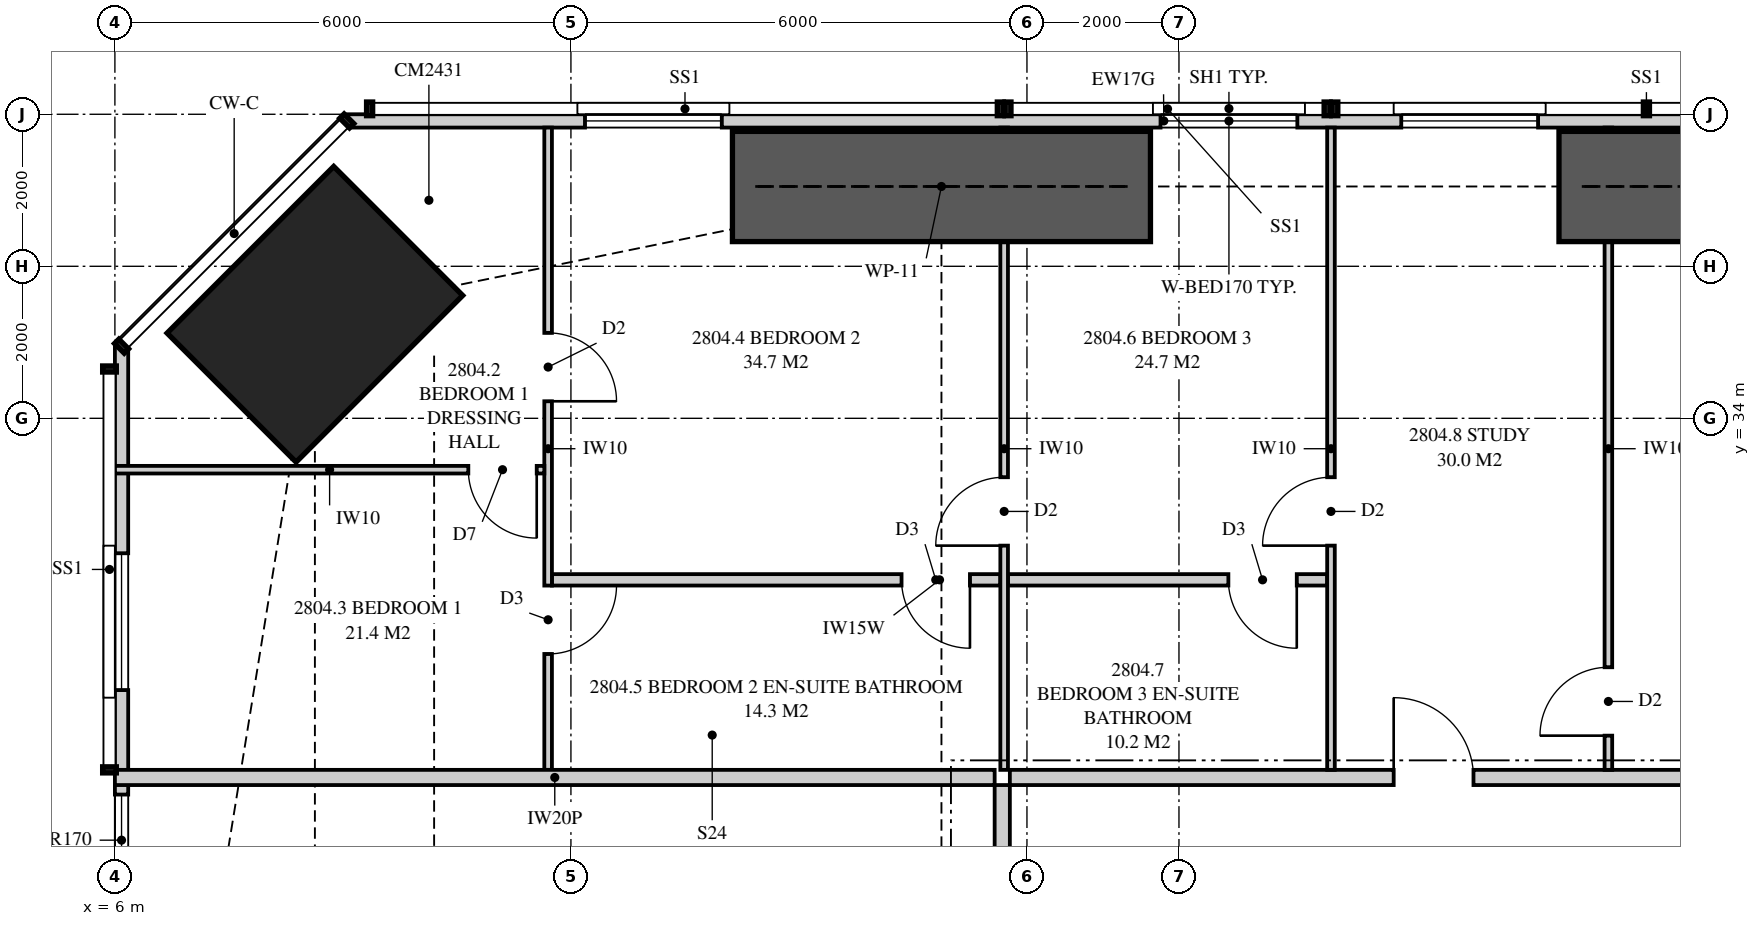
"""IFC4 building model, lengths in metres.
Left out: names, types, materials, properties, quantities, classifications, styles, units other than length and angle.
Written with IfcOpenShell. Run it as: python <this file> out.ifc"""

import sys

from ifc_helpers import new_model, si_unit, direction, frame, frame_2d, origin, origin_2d, place, context, subcontext, project, spatial, polyline, rectangle, outline, extrude, element, fill, save


model = new_model("IFC4")
c1 = context("Model", 3, precision=1e-05, world=origin(), true_north=direction((0.0, 1.0)))
c2 = subcontext(c1, "Body", "Model", "MODEL_VIEW")
j1 = project(units=[si_unit("LENGTHUNIT", "METRE"), si_unit("PLANEANGLEUNIT", "RADIAN")], contexts=[c1])
p1 = place(None, origin())
s1 = spatial("IfcSite", under=j1, at=p1, CompositionType="ELEMENT")
p2 = place(p1, origin())
s2 = spatial("IfcBuilding", under=s1, at=p2, CompositionType="ELEMENT")
p3 = place(p2, frame((0.0, 0.0, 104.85)))
s3 = spatial("IfcBuildingStorey", under=s2, at=p3, CompositionType="ELEMENT", Elevation=104.85)
p4 = place(p3, frame((8.631, 35.369, 0.0), z_axis=(0.0, 0.0, 1.0), x_axis=(0.707106781187, -0.707106781187, 0.0)))
e1 = element("IfcColumn", 1, at=p4, inside=s3, PredefinedType="COLUMN", context=c2, shape_type="SweptSolid", body=[
    extrude(rectangle(XDim=2.4, YDim=3.1, at=origin_2d()), origin(), (0.0, 0.0, 1.0), 3.35),
])
p5 = place(p3, frame((30.551, 37.913, 0.0), z_axis=(0.0, 0.0, 1.0), x_axis=(-1.0, 0.0, 0.0)))
e2 = element("IfcWall", 2, at=p5, inside=s3, PredefinedType="SOLIDWALL", context=c2, shape_type="SweptSolid", body=[
    extrude(outline(polyline([(0.0, 0.0), (21.499, 0.0), (21.499, 3.11), (13.879, 3.11), (13.879, 2.15), (13.834, 2.15), (13.834, 3.11), (13.676, 3.11), (13.676, 2.15), (0.0, 2.15), (0.0, 0.0)])), frame((0.0, 0.087, 0.0), z_axis=(0.0, -1.0, 0.0), x_axis=(1.0, 0.0, 0.0)), (0.0, 0.0, 1.0), 0.175),
])
p6 = place(p5, frame((5.826, 0.0, 0.4)))
e3 = element("IfcOpeningElement", 3, at=p6, cuts=e2, PredefinedType="OPENING", context=c2, shape_type="SweptSolid", body=[
    extrude(rectangle(XDim=1.8, YDim=1.7, at=frame_2d((0.9, 0.85))), frame((0.0, 0.097, 0.0), z_axis=(0.0, -1.0, 0.0), x_axis=(1.0, 0.0, 0.0)), (0.0, 0.0, 1.0), 0.195),
])
p7 = place(p5, frame((8.993, 0.0, 0.4)))
e4 = element("IfcOpeningElement", 4, at=p7, cuts=e2, PredefinedType="OPENING", context=c2, shape_type="SweptSolid", body=[
    extrude(rectangle(XDim=1.8, YDim=1.7, at=frame_2d((0.9, 0.85))), frame((0.0, 0.097, 0.0), z_axis=(0.0, -1.0, 0.0), x_axis=(1.0, 0.0, 0.0)), (0.0, 0.0, 1.0), 0.195),
])
p8 = place(p5, frame((16.566, 0.0, 0.4)))
e5 = element("IfcOpeningElement", 5, at=p8, cuts=e2, PredefinedType="OPENING", context=c2, shape_type="SweptSolid", body=[
    extrude(rectangle(XDim=1.8, YDim=1.7, at=frame_2d((0.9, 0.85))), frame((0.0, 0.097, 0.0), z_axis=(0.0, -1.0, 0.0), x_axis=(1.0, 0.0, 0.0)), (0.0, 0.0, 1.0), 0.195),
])
p9 = place(p3, frame((6.087, 34.949, 0.0), z_axis=(0.0, 0.0, 1.0), x_axis=(0.0, -1.0, 0.0)))
e6 = element("IfcWall", 6, at=p9, inside=s3, PredefinedType="SOLIDWALL", context=c2, shape_type="SweptSolid", body=[
    extrude(outline(polyline([(0.0, 0.0), (15.799, 0.0), (15.799, 2.15), (9.949, 2.15), (9.949, 3.11), (9.823, 3.11), (9.823, 2.15), (9.73, 2.15), (9.73, 3.11), (0.0, 3.11), (0.0, 0.0)])), frame((0.0, 0.087, 0.0), z_axis=(0.0, -1.0, 0.0), x_axis=(1.0, 0.0, 0.0)), (0.0, 0.0, 1.0), 0.175),
])
p10 = place(p9, frame((2.724, 0.0, 0.4)))
e7 = element("IfcOpeningElement", 7, at=p10, cuts=e6, PredefinedType="OPENING", context=c2, shape_type="SweptSolid", body=[
    extrude(rectangle(XDim=1.8, YDim=1.7, at=frame_2d((0.9, 0.85))), frame((0.0, 0.097, 0.0), z_axis=(0.0, -1.0, 0.0), x_axis=(1.0, 0.0, 0.0)), (0.0, 0.0, 1.0), 0.195),
])
p11 = place(p9, frame((5.899, 0.0, 0.4)))
e8 = element("IfcOpeningElement", 8, at=p11, cuts=e6, PredefinedType="OPENING", context=c2, shape_type="SweptSolid", body=[
    extrude(rectangle(XDim=1.2, YDim=1.7, at=frame_2d((0.6, 0.85))), frame((0.0, 0.097, 0.0), z_axis=(0.0, -1.0, 0.0), x_axis=(1.0, 0.0, 0.0)), (0.0, 0.0, 1.0), 0.195),
])
p12 = place(p9, frame((13.049, 0.0, 0.4)))
e9 = element("IfcOpeningElement", 9, at=p12, cuts=e6, PredefinedType="OPENING", context=c2, shape_type="SweptSolid", body=[
    extrude(rectangle(XDim=1.8, YDim=1.7, at=frame_2d((0.9, 0.85))), frame((0.0, 0.097, 0.0), z_axis=(0.0, -1.0, 0.0), x_axis=(1.0, 0.0, 0.0)), (0.0, 0.0, 1.0), 0.195),
])
p13 = place(p3, frame((17.775, 29.275, 0.0), z_axis=(0.0, 0.0, 1.0), x_axis=(1.0, 0.0, 0.0)))
e10 = element("IfcWall", 10, at=p13, inside=s3, PredefinedType="PARTITIONING", context=c2, shape_type="SweptSolid", body=[
    extrude(rectangle(XDim=9.188, YDim=0.2, at=frame_2d((4.594, 0.0))), origin(), (0.0, 0.0, 1.0), 3.11),
])
p14 = place(p13, frame((5.05, 0.0, 0.0)))
e11 = element("IfcOpeningElement", 11, at=p14, cuts=e10, PredefinedType="OPENING", context=c2, shape_type="SweptSolid", body=[
    extrude(rectangle(XDim=1.05, YDim=2.2, at=frame_2d((0.525, 1.1))), frame((0.0, 0.11, 0.0), z_axis=(0.0, -1.0, 0.0), x_axis=(1.0, 0.0, 0.0)), (0.0, 0.0, 1.0), 0.22),
])
p15 = place(p3, frame((11.7, 37.825, 0.0), z_axis=(0.0, 0.0, 1.0), x_axis=(0.0, -1.0, 0.0)))
e12 = element("IfcWall", 12, at=p15, inside=s3, PredefinedType="PARTITIONING", context=c2, shape_type="SweptSolid", body=[
    extrude(outline(polyline([(0.0, 0.0), (8.45, 0.0), (8.45, 3.11), (2.708, 3.11), (2.708, 2.15), (0.953, 2.15), (0.953, 3.11), (0.0, 3.11), (0.0, 0.0)])), frame((0.0, 0.05, 0.0), z_axis=(0.0, -1.0, 0.0), x_axis=(1.0, 0.0, 0.0)), (0.0, 0.0, 1.0), 0.1),
])
p16 = place(p15, frame((2.701, 0.0, 0.0)))
e13 = element("IfcOpeningElement", 13, at=p16, cuts=e12, PredefinedType="OPENING", context=c2, shape_type="SweptSolid", body=[
    extrude(rectangle(XDim=0.9, YDim=2.1, at=frame_2d((0.45, 1.05))), frame((0.0, 0.06, 0.0), z_axis=(0.0, -1.0, 0.0), x_axis=(1.0, 0.0, 0.0)), (0.0, 0.0, 1.0), 0.12),
])
p17 = place(p15, frame((6.025, 0.0, 0.0)))
e14 = element("IfcOpeningElement", 14, at=p17, cuts=e12, PredefinedType="OPENING", context=c2, shape_type="SweptSolid", body=[
    extrude(rectangle(XDim=0.9, YDim=2.1, at=frame_2d((0.45, 1.05))), frame((0.0, 0.06, 0.0), z_axis=(0.0, -1.0, 0.0), x_axis=(1.0, 0.0, 0.0)), (0.0, 0.0, 1.0), 0.12),
])
p18 = place(p3, frame((17.7, 37.825, 0.0), z_axis=(0.0, 0.0, 1.0), x_axis=(0.0, -1.0, 0.0)))
e15 = element("IfcWall", 15, at=p18, inside=s3, PredefinedType="PARTITIONING", context=c2, shape_type="SweptSolid", body=[
    extrude(outline(polyline([(1.635, 2.15), (0.0, 2.15), (0.0, 0.0), (8.45, 0.0), (8.45, 3.11), (1.635, 3.11), (1.635, 2.15)]), holes=[polyline([(1.021, 0.116), (0.529, 0.116), (0.529, 0.906), (1.021, 0.906), (1.021, 0.116)]), polyline([(1.021, 1.244), (0.529, 1.244), (0.529, 2.034), (1.021, 2.034), (1.021, 1.244)])]), frame((0.0, 0.05, 0.0), z_axis=(0.0, -1.0, 0.0), x_axis=(1.0, 0.0, 0.0)), (0.0, 0.0, 1.0), 0.1),
])
p19 = place(p18, frame((4.6, 0.0, 0.0)))
e16 = element("IfcOpeningElement", 16, at=p19, cuts=e15, PredefinedType="OPENING", context=c2, shape_type="SweptSolid", body=[
    extrude(rectangle(XDim=0.9, YDim=2.1, at=frame_2d((0.45, 1.05))), frame((0.0, 0.06, 0.0), z_axis=(0.0, -1.0, 0.0), x_axis=(1.0, 0.0, 0.0)), (0.0, 0.0, 1.0), 0.12),
])
p20 = place(p3, frame((22.0, 37.825, 0.0), z_axis=(0.0, 0.0, 1.0), x_axis=(0.0, -1.0, 0.0)))
e17 = element("IfcWall", 17, at=p20, inside=s3, PredefinedType="PARTITIONING", context=c2, shape_type="SweptSolid", body=[
    extrude(outline(polyline([(0.0, 0.0), (8.45, 0.0), (8.45, 3.11), (1.635, 3.11), (1.635, 2.15), (0.0, 2.15), (0.0, 3.11), (0.0, 0.0)])), frame((0.0, 0.05, 0.0), z_axis=(0.0, -1.0, 0.0), x_axis=(1.0, 0.0, 0.0)), (0.0, 0.0, 1.0), 0.1),
])
p21 = place(p20, frame((4.6, 0.0, 0.0)))
e18 = element("IfcOpeningElement", 18, at=p21, cuts=e17, PredefinedType="OPENING", context=c2, shape_type="SweptSolid", body=[
    extrude(rectangle(XDim=0.9, YDim=2.1, at=frame_2d((0.45, 1.05))), frame((0.0, 0.06, 0.0), z_axis=(0.0, -1.0, 0.0), x_axis=(1.0, 0.0, 0.0)), (0.0, 0.0, 1.0), 0.12),
])
p22 = place(p3, frame((6.0, 33.324, 0.0), z_axis=(0.0, 0.0, 1.0), x_axis=(1.0, 0.0, 0.0)))
e19 = element("IfcWall", 19, at=p22, inside=s3, PredefinedType="PARTITIONING", context=c2, shape_type="SweptSolid", body=[
    extrude(outline(polyline([(0.0, 0.0), (5.65, 0.0), (5.65, 3.11), (5.46, 3.11), (5.46, 2.51), (3.171, 2.51), (3.171, 2.15), (1.429, 2.15), (1.429, 3.11), (0.0, 3.11), (0.0, 0.0)])), frame((0.0, 0.05, 0.0), z_axis=(0.0, -1.0, 0.0), x_axis=(1.0, 0.0, 0.0)), (0.0, 0.0, 1.0), 0.1),
])
p23 = place(p22, frame((4.65, 0.0, 0.0)))
e20 = element("IfcOpeningElement", 20, at=p23, cuts=e19, PredefinedType="OPENING", context=c2, shape_type="SweptSolid", body=[
    extrude(rectangle(XDim=0.9, YDim=2.1, at=frame_2d((0.45, 1.05))), frame((0.0, 0.06, 0.0), z_axis=(0.0, -1.0, 0.0), x_axis=(1.0, 0.0, 0.0)), (0.0, 0.0, 1.0), 0.12),
])
p24 = place(p3, frame((11.75, 31.875, 0.0), z_axis=(0.0, 0.0, 1.0), x_axis=(1.0, 0.0, 0.0)))
e21 = element("IfcWall", 21, at=p24, inside=s3, PredefinedType="PLUMBINGWALL", context=c2, shape_type="SweptSolid", body=[
    extrude(outline(polyline([(0.0, 0.0), (5.9, 0.0), (5.9, 3.11), (5.438, 3.11), (5.438, 2.541), (4.812, 2.541), (4.812, 3.11), (0.0, 3.11), (0.0, 0.0)])), frame((0.0, 0.075, 0.0), z_axis=(0.0, -1.0, 0.0), x_axis=(1.0, 0.0, 0.0)), (0.0, 0.0, 1.0), 0.15),
])
p25 = place(p24, frame((4.6, 0.0, 0.0)))
e22 = element("IfcOpeningElement", 22, at=p25, cuts=e21, PredefinedType="OPENING", context=c2, shape_type="SweptSolid", body=[
    extrude(rectangle(XDim=0.9, YDim=2.1, at=frame_2d((0.45, 1.05))), frame((0.0, 0.085, 0.0), z_axis=(0.0, -1.0, 0.0), x_axis=(1.0, 0.0, 0.0)), (0.0, 0.0, 1.0), 0.17),
])
p26 = place(p3, frame((17.75, 31.875, 0.0), z_axis=(0.0, 0.0, 1.0), x_axis=(1.0, 0.0, 0.0)))
e23 = element("IfcWall", 23, at=p26, inside=s3, PredefinedType="PLUMBINGWALL", context=c2, shape_type="SweptSolid", body=[
    extrude(rectangle(XDim=4.2, YDim=0.15, at=frame_2d((2.1, 0.0))), origin(), (0.0, 0.0, 1.0), 3.11),
])
p27 = place(p26, frame((2.9, 0.0, 0.0)))
e24 = element("IfcOpeningElement", 24, at=p27, cuts=e23, PredefinedType="OPENING", context=c2, shape_type="SweptSolid", body=[
    extrude(rectangle(XDim=0.9, YDim=2.1, at=frame_2d((0.45, 1.05))), frame((0.0, 0.085, 0.0), z_axis=(0.0, -1.0, 0.0), x_axis=(1.0, 0.0, 0.0)), (0.0, 0.0, 1.0), 0.17),
])
p28 = place(p3, frame((25.65, 37.825, 0.0), z_axis=(0.0, 0.0, 1.0), x_axis=(0.0, -1.0, 0.0)))
e25 = element("IfcWall", 25, at=p28, inside=s3, PredefinedType="PARTITIONING", context=c2, shape_type="SweptSolid", body=[
    extrude(outline(polyline([(0.529, 2.15), (0.0, 2.15), (0.0, 0.0), (0.529, 0.0), (0.529, 0.034), (1.021, 0.034), (1.021, 0.0), (8.45, 0.0), (8.45, 3.11), (1.635, 3.11), (1.635, 2.15), (1.021, 2.15), (1.021, 2.116), (0.529, 2.116), (0.529, 2.15)])), frame((0.0, 0.05, 0.0), z_axis=(0.0, -1.0, 0.0), x_axis=(1.0, 0.0, 0.0)), (0.0, 0.0, 1.0), 0.1),
])
p29 = place(p28, frame((7.1, 0.0, 0.0)))
e26 = element("IfcOpeningElement", 26, at=p29, cuts=e25, PredefinedType="OPENING", context=c2, shape_type="SweptSolid", body=[
    extrude(rectangle(XDim=0.9, YDim=2.1, at=frame_2d((0.45, 1.05))), frame((0.0, 0.06, 0.0), z_axis=(0.0, -1.0, 0.0), x_axis=(1.0, 0.0, 0.0)), (0.0, 0.0, 1.0), 0.12),
])
p30 = place(p3, frame((6.0, 29.275, 0.0), z_axis=(0.0, 0.0, 1.0), x_axis=(1.0, 0.0, 0.0)))
e27 = element("IfcWall", 27, at=p30, inside=s3, PredefinedType="PARTITIONING", context=c2, shape_type="SweptSolid", body=[
    extrude(outline(polyline([(0.0, 0.0), (11.575, 0.0), (11.575, 3.11), (11.212, 3.11), (11.212, 2.541), (10.538, 2.541), (10.538, 3.11), (5.51, 3.11), (5.51, 2.51), (2.969, 2.51), (2.969, 2.541), (2.565, 2.541), (2.565, 2.15), (0.721, 2.15), (0.721, 3.11), (0.0, 3.11), (0.0, 0.0)])), frame((0.0, 0.1, 0.0), z_axis=(0.0, -1.0, 0.0), x_axis=(1.0, 0.0, 0.0)), (0.0, 0.0, 1.0), 0.2),
])
p31 = place(p3, frame((17.675, 22.9, 0.0), z_axis=(0.0, 0.0, 1.0), x_axis=(0.0, 1.0, 0.0)))
e28 = element("IfcWall", 28, at=p31, inside=s3, PredefinedType="PARTITIONING", context=c2, shape_type="SweptSolid", body=[
    extrude(outline(polyline([(0.0, 0.0), (6.275, 0.0), (6.275, 3.11), (3.862, 3.11), (3.862, 2.541), (3.188, 2.541), (3.188, 3.11), (0.0, 3.11), (0.0, 0.0)])), frame((0.0, 0.1, 0.0), z_axis=(0.0, -1.0, 0.0), x_axis=(1.0, 0.0, 0.0)), (0.0, 0.0, 1.0), 0.2),
])
p32 = place(p31, frame((2.238, 0.0, 0.0)))
e29 = element("IfcOpeningElement", 29, at=p32, cuts=e28, PredefinedType="OPENING", context=c2, shape_type="SweptSolid", body=[
    extrude(rectangle(XDim=1.8, YDim=2.1, at=frame_2d((0.9, 1.05))), frame((0.0, 0.11, 0.0), z_axis=(0.0, -1.0, 0.0), x_axis=(1.0, 0.0, 0.0)), (0.0, 0.0, 1.0), 0.22),
])
for number, where, z_axis, x_axis in (
    (30, (25.0, 37.05, 0.0), (0.0, 0.0, 1.0), (1.0, 0.0, 0.0)),
    (31, (14.125, 37.05, 0.0), (0.0, 0.0, 1.0), (1.0, 0.0, 0.0)),
):
    element("IfcWall", number, at=place(p3, frame(where, z_axis=z_axis, x_axis=x_axis)), inside=s3, PredefinedType="SHEAR", context=c2, shape_type="SweptSolid", body=[
        extrude(rectangle(XDim=5.5, YDim=1.45, at=frame_2d((2.75, 0.0))), origin(), (0.0, 0.0, 1.0), 3.35),
    ])
p33 = place(p6, origin())
e32 = element("IfcWindow", 32, at=p33, inside=s3, PartitioningType="SINGLE_PANEL", PredefinedType="WINDOW", context=c2, shape_type="SweptSolid", body=[
    extrude(rectangle(XDim=1.8, YDim=1.7, at=frame_2d((0.9, 0.85))), frame((0.0, 0.03, 0.0), z_axis=(0.0, -1.0, 0.0), x_axis=(1.0, 0.0, 0.0)), (0.0, 0.0, 1.0), 0.06),
])
fill(e3, e32)
p34 = place(p7, origin())
e33 = element("IfcWindow", 33, at=p34, inside=s3, PartitioningType="SINGLE_PANEL", PredefinedType="WINDOW", context=c2, shape_type="SweptSolid", body=[
    extrude(rectangle(XDim=1.8, YDim=1.7, at=frame_2d((0.9, 0.85))), frame((0.0, 0.03, 0.0), z_axis=(0.0, -1.0, 0.0), x_axis=(1.0, 0.0, 0.0)), (0.0, 0.0, 1.0), 0.06),
])
fill(e4, e33)
p35 = place(p8, origin())
e34 = element("IfcWindow", 34, at=p35, inside=s3, PartitioningType="SINGLE_PANEL", PredefinedType="WINDOW", context=c2, shape_type="SweptSolid", body=[
    extrude(rectangle(XDim=1.8, YDim=1.7, at=frame_2d((0.9, 0.85))), frame((0.0, 0.03, 0.0), z_axis=(0.0, -1.0, 0.0), x_axis=(1.0, 0.0, 0.0)), (0.0, 0.0, 1.0), 0.06),
])
fill(e5, e34)
p36 = place(p10, origin())
e35 = element("IfcWindow", 35, at=p36, inside=s3, PartitioningType="SINGLE_PANEL", PredefinedType="WINDOW", context=c2, shape_type="SweptSolid", body=[
    extrude(rectangle(XDim=1.8, YDim=1.7, at=frame_2d((0.9, 0.85))), frame((0.0, 0.03, 0.0), z_axis=(0.0, -1.0, 0.0), x_axis=(1.0, 0.0, 0.0)), (0.0, 0.0, 1.0), 0.06),
])
fill(e7, e35)
p37 = place(p11, origin())
e36 = element("IfcWindow", 36, at=p37, inside=s3, PartitioningType="SINGLE_PANEL", PredefinedType="WINDOW", context=c2, shape_type="SweptSolid", body=[
    extrude(rectangle(XDim=1.2, YDim=1.7, at=frame_2d((0.6, 0.85))), frame((0.0, 0.03, 0.0), z_axis=(0.0, -1.0, 0.0), x_axis=(1.0, 0.0, 0.0)), (0.0, 0.0, 1.0), 0.06),
])
fill(e8, e36)
p38 = place(p14, origin())
e37 = element("IfcDoor", 37, at=p38, inside=s3, OperationType="SINGLE_SWING_LEFT", PredefinedType="DOOR", context=c2, shape_type="SweptSolid", body=[
    extrude(rectangle(XDim=1.05, YDim=2.2, at=frame_2d((0.525, 1.1))), frame((0.0, 0.025, 0.0), z_axis=(0.0, -1.0, 0.0), x_axis=(1.0, 0.0, 0.0)), (0.0, 0.0, 1.0), 0.05),
])
fill(e11, e37)
p39 = place(p23, frame((0.9, 0.0, 0.0), z_axis=(0.0, 0.0, 1.0), x_axis=(-1.0, 0.0, 0.0)))
e38 = element("IfcDoor", 38, at=p39, inside=s3, OperationType="SINGLE_SWING_LEFT", PredefinedType="DOOR", context=c2, shape_type="SweptSolid", body=[
    extrude(rectangle(XDim=0.9, YDim=2.1, at=frame_2d((0.45, 1.05))), frame((0.0, 0.025, 0.0), z_axis=(0.0, -1.0, 0.0), x_axis=(1.0, 0.0, 0.0)), (0.0, 0.0, 1.0), 0.05),
])
fill(e20, e38)
p40 = place(p16, origin())
e39 = element("IfcDoor", 39, at=p40, inside=s3, OperationType="SINGLE_SWING_RIGHT", PredefinedType="DOOR", context=c2, shape_type="SweptSolid", body=[
    extrude(rectangle(XDim=0.9, YDim=2.1, at=frame_2d((0.45, 1.05))), frame((0.0, 0.025, 0.0), z_axis=(0.0, -1.0, 0.0), x_axis=(1.0, 0.0, 0.0)), (0.0, 0.0, 1.0), 0.05),
])
fill(e13, e39)
p41 = place(p19, frame((0.9, 0.0, 0.0), z_axis=(0.0, 0.0, 1.0), x_axis=(-1.0, 0.0, 0.0)))
e40 = element("IfcDoor", 40, at=p41, inside=s3, OperationType="SINGLE_SWING_LEFT", PredefinedType="DOOR", context=c2, shape_type="SweptSolid", body=[
    extrude(rectangle(XDim=0.9, YDim=2.1, at=frame_2d((0.45, 1.05))), frame((0.0, 0.025, 0.0), z_axis=(0.0, -1.0, 0.0), x_axis=(1.0, 0.0, 0.0)), (0.0, 0.0, 1.0), 0.05),
])
fill(e16, e40)
p42 = place(p25, frame((0.9, 0.0, 0.0), z_axis=(0.0, 0.0, 1.0), x_axis=(-1.0, 0.0, 0.0)))
e41 = element("IfcDoor", 41, at=p42, inside=s3, OperationType="SINGLE_SWING_LEFT", PredefinedType="DOOR", context=c2, shape_type="SweptSolid", body=[
    extrude(rectangle(XDim=0.9, YDim=2.1, at=frame_2d((0.45, 1.05))), frame((0.0, 0.025, 0.0), z_axis=(0.0, -1.0, 0.0), x_axis=(1.0, 0.0, 0.0)), (0.0, 0.0, 1.0), 0.05),
])
fill(e22, e41)
p43 = place(p21, frame((0.9, 0.0, 0.0), z_axis=(0.0, 0.0, 1.0), x_axis=(-1.0, 0.0, 0.0)))
e42 = element("IfcDoor", 42, at=p43, inside=s3, OperationType="SINGLE_SWING_LEFT", PredefinedType="DOOR", context=c2, shape_type="SweptSolid", body=[
    extrude(rectangle(XDim=0.9, YDim=2.1, at=frame_2d((0.45, 1.05))), frame((0.0, 0.025, 0.0), z_axis=(0.0, -1.0, 0.0), x_axis=(1.0, 0.0, 0.0)), (0.0, 0.0, 1.0), 0.05),
])
fill(e18, e42)
p44 = place(p27, frame((0.9, 0.0, 0.0), z_axis=(0.0, 0.0, 1.0), x_axis=(-1.0, 0.0, 0.0)))
e43 = element("IfcDoor", 43, at=p44, inside=s3, OperationType="SINGLE_SWING_LEFT", PredefinedType="DOOR", context=c2, shape_type="SweptSolid", body=[
    extrude(rectangle(XDim=0.9, YDim=2.1, at=frame_2d((0.45, 1.05))), frame((0.0, 0.025, 0.0), z_axis=(0.0, -1.0, 0.0), x_axis=(1.0, 0.0, 0.0)), (0.0, 0.0, 1.0), 0.05),
])
fill(e24, e43)
p45 = place(p17, origin())
e44 = element("IfcDoor", 44, at=p45, inside=s3, OperationType="SINGLE_SWING_LEFT", PredefinedType="DOOR", context=c2, shape_type="SweptSolid", body=[
    extrude(rectangle(XDim=0.9, YDim=2.1, at=frame_2d((0.45, 1.05))), frame((0.0, 0.025, 0.0), z_axis=(0.0, -1.0, 0.0), x_axis=(1.0, 0.0, 0.0)), (0.0, 0.0, 1.0), 0.05),
])
fill(e14, e44)
p46 = place(p29, frame((0.9, 0.0, 0.0), z_axis=(0.0, 0.0, 1.0), x_axis=(-1.0, 0.0, 0.0)))
e45 = element("IfcDoor", 45, at=p46, inside=s3, OperationType="SINGLE_SWING_LEFT", PredefinedType="DOOR", context=c2, shape_type="SweptSolid", body=[
    extrude(rectangle(XDim=0.9, YDim=2.1, at=frame_2d((0.45, 1.05))), frame((0.0, 0.025, 0.0), z_axis=(0.0, -1.0, 0.0), x_axis=(1.0, 0.0, 0.0)), (0.0, 0.0, 1.0), 0.05),
])
fill(e26, e45)
save(model, sys.argv[1])
